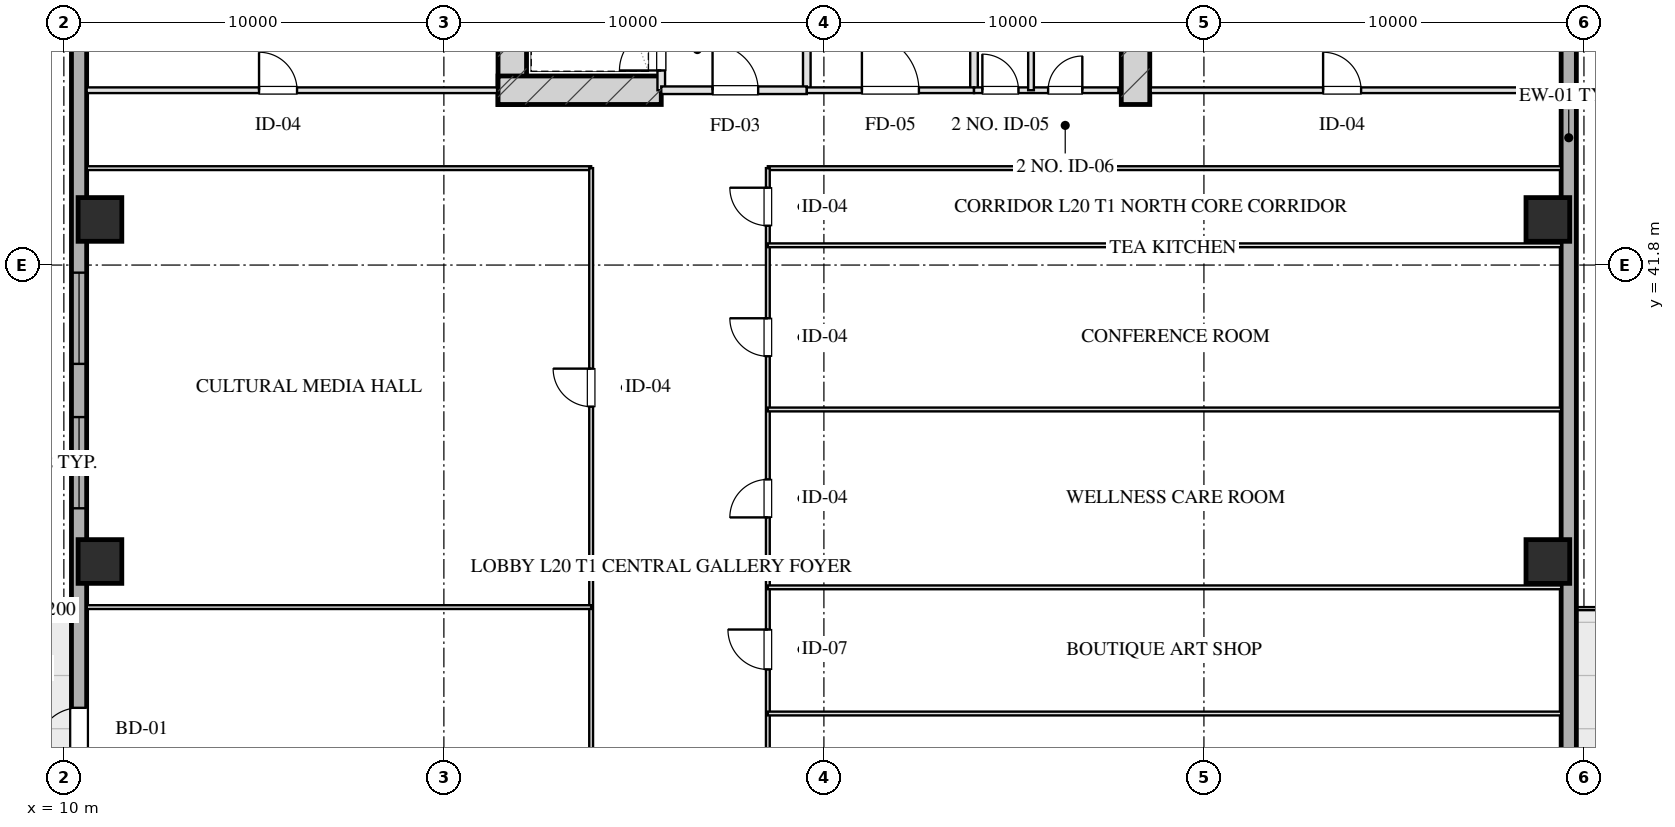
"""IFC4 building model, lengths in metres.
Left out: names, types, materials, properties, quantities, classifications, styles, units other than length and angle.
Written with IfcOpenShell. Run it as: python <this file> out.ifc"""

import sys

from ifc_helpers import new_model, si_unit, direction, frame, frame_2d, origin, origin_2d, place, context, subcontext, project, spatial, rectangle, hollow_rectangle, extrude, element, fill, save


model = new_model("IFC4")
c1 = context("Model", 3, precision=1e-05, world=origin(), true_north=direction((0.0, 1.0)))
c2 = subcontext(c1, "Body", "Model", "MODEL_VIEW")
j1 = project(units=[si_unit("LENGTHUNIT", "METRE"), si_unit("PLANEANGLEUNIT", "RADIAN")], contexts=[c1])
p1 = place(None, origin())
s1 = spatial("IfcSite", under=j1, at=p1, CompositionType="ELEMENT")
p2 = place(p1, origin())
s2 = spatial("IfcBuilding", under=s1, at=p2, CompositionType="ELEMENT")
p3 = place(p2, frame((0.0, 0.0, 81.65)))
s3 = spatial("IfcBuildingStorey", under=s2, at=p3, CompositionType="ELEMENT", Elevation=81.65)
for number, where, z_axis, x_axis in (
    (1, (21.8, 46.025, 0.0), (0.0, 0.0, 1.0), (0.0, 1.0, 0.0)),
    (2, (38.2, 46.025, 0.0), (0.0, 0.0, 1.0), (0.0, 1.0, 0.0)),
):
    element("IfcWall", number, at=place(p3, frame(where, z_axis=z_axis, x_axis=x_axis)), inside=s3, PredefinedType="SHEAR", context=c2, shape_type="SweptSolid", body=[
        extrude(rectangle(XDim=9.63, YDim=0.75, at=frame_2d((4.815, 0.0))), origin(), (0.0, 0.0, 1.0), 3.45),
    ])
p4 = place(p3, frame((21.425, 46.4, 0.0), z_axis=(0.0, 0.0, 1.0), x_axis=(1.0, 0.0, 0.0)))
e3 = element("IfcWall", 3, at=p4, inside=s3, PredefinedType="SHEAR", context=c2, shape_type="SweptSolid", body=[
    extrude(rectangle(XDim=4.295, YDim=0.75, at=frame_2d((2.147, 0.0))), origin(), (0.0, 0.0, 1.0), 3.45),
])
for number, where, z_axis, x_axis in (
    (4, (10.95, 34.0, 0.0), (0.0, 0.0, 1.0), (1.0, 0.0, 0.0)),
    (5, (10.95, 43.0, 0.0), (0.0, 0.0, 1.0), (1.0, 0.0, 0.0)),
    (6, (49.05, 34.0, 0.0), (0.0, 0.0, 1.0), (1.0, 0.0, 0.0)),
    (7, (49.05, 43.0, 0.0), (0.0, 0.0, 1.0), (1.0, 0.0, 0.0)),
):
    element("IfcColumn", number, at=place(p3, frame(where, z_axis=z_axis, x_axis=x_axis)), inside=s3, PredefinedType="COLUMN", context=c2, shape_type="SweptSolid", body=[
        extrude(hollow_rectangle(XDim=1.15, YDim=1.15, WallThickness=0.04, at=origin_2d()), origin(), (0.0, 0.0, 1.0), 3.451),
    ])
p5 = place(p3, frame((10.4, 7.2, 0.0), z_axis=(0.0, 0.0, 1.0), x_axis=(0.0, 1.0, 0.0)))
e8 = element("IfcWall", 8, at=p5, inside=s3, PredefinedType="SOLIDWALL", context=c2, shape_type="SweptSolid", body=[
    extrude(rectangle(XDim=53.6, YDim=0.4, at=frame_2d((26.8, 0.0))), origin(), (0.0, 0.0, 1.0), 2.61),
])
p6 = place(p5, frame((28.2, 0.0, 0.75)))
e9 = element("IfcOpeningElement", 9, at=p6, cuts=e8, PredefinedType="OPENING", context=c2, shape_type="SweptSolid", body=[
    extrude(rectangle(XDim=2.4, YDim=1.46, at=frame_2d((1.2, 0.73))), frame((0.0, 0.21, 0.0), z_axis=(0.0, -1.0, 0.0), x_axis=(1.0, 0.0, 0.0)), (0.0, 0.0, 1.0), 0.42),
])
p7 = place(p5, frame((32.0, 0.0, 0.75)))
e10 = element("IfcOpeningElement", 10, at=p7, cuts=e8, PredefinedType="OPENING", context=c2, shape_type="SweptSolid", body=[
    extrude(rectangle(XDim=2.4, YDim=1.46, at=frame_2d((1.2, 0.73))), frame((0.0, 0.21, 0.0), z_axis=(0.0, -1.0, 0.0), x_axis=(1.0, 0.0, 0.0)), (0.0, 0.0, 1.0), 0.42),
])
p8 = place(p5, frame((21.85, 0.0, 0.0)))
e11 = element("IfcOpeningElement", 11, at=p8, cuts=e8, PredefinedType="OPENING", context=c2, shape_type="SweptSolid", body=[
    extrude(rectangle(XDim=1.1, YDim=2.15, at=frame_2d((0.55, 1.075))), frame((0.0, 0.21, 0.0), z_axis=(0.0, -1.0, 0.0), x_axis=(1.0, 0.0, 0.0)), (0.0, 0.0, 1.0), 0.42),
])
p9 = place(p3, frame((49.6, 60.8, 0.0), z_axis=(0.0, 0.0, 1.0), x_axis=(0.0, -1.0, 0.0)))
e12 = element("IfcWall", 12, at=p9, inside=s3, PredefinedType="SOLIDWALL", context=c2, shape_type="SweptSolid", body=[
    extrude(rectangle(XDim=53.6, YDim=0.4, at=frame_2d((26.8, 0.0))), origin(), (0.0, 0.0, 1.0), 2.61),
])
p10 = place(p9, frame((32.05, 0.0, 0.0)))
e13 = element("IfcOpeningElement", 13, at=p10, cuts=e12, PredefinedType="OPENING", context=c2, shape_type="SweptSolid", body=[
    extrude(rectangle(XDim=1.1, YDim=2.15, at=frame_2d((0.55, 1.075))), frame((0.0, 0.21, 0.0), z_axis=(0.0, -1.0, 0.0), x_axis=(1.0, 0.0, 0.0)), (0.0, 0.0, 1.0), 0.42),
])
p11 = place(p3, frame((25.72, 46.4, 0.0), z_axis=(0.0, 0.0, 1.0), x_axis=(0.0, 1.0, 0.0)))
e14 = element("IfcWall", 14, at=p11, inside=s3, PredefinedType="PARTITIONING", context=c2, shape_type="SweptSolid", body=[
    extrude(rectangle(XDim=1.9, YDim=0.2, at=frame_2d((0.95, 0.0))), origin(), (0.0, 0.0, 1.0), 3.175),
])
p12 = place(p11, frame((0.52, 0.0, 0.0)))
e15 = element("IfcOpeningElement", 15, at=p12, cuts=e14, PredefinedType="OPENING", context=c2, shape_type="SweptSolid", body=[
    extrude(rectangle(XDim=1.1, YDim=2.05, at=frame_2d((0.55, 1.025))), frame((0.0, 0.11, 0.0), z_axis=(0.0, -1.0, 0.0), x_axis=(1.0, 0.0, 0.0)), (0.0, 0.0, 1.0), 0.22),
])
p13 = place(p3, frame((29.55, 46.4, 0.0), z_axis=(0.0, 0.0, 1.0), x_axis=(0.0, 1.0, 0.0)))
e16 = element("IfcWall", 16, at=p13, inside=s3, PredefinedType="PARTITIONING", context=c2, shape_type="SweptSolid", body=[
    extrude(rectangle(XDim=8.43, YDim=0.2, at=frame_2d((4.215, 0.0))), origin(), (0.0, 0.0, 1.0), 3.175),
])
p14 = place(p3, frame((25.72, 46.4, 0.0), z_axis=(0.0, 0.0, 1.0), x_axis=(1.0, 0.0, 0.0)))
e17 = element("IfcWall", 17, at=p14, inside=s3, PredefinedType="PARTITIONING", context=c2, shape_type="SweptSolid", body=[
    extrude(rectangle(XDim=3.83, YDim=0.2, at=frame_2d((1.915, 0.0))), origin(), (0.0, 0.0, 1.0), 3.175),
])
p15 = place(p14, frame((1.35, 0.0, 0.0)))
e18 = element("IfcOpeningElement", 18, at=p15, cuts=e17, PredefinedType="OPENING", context=c2, shape_type="SweptSolid", body=[
    extrude(rectangle(XDim=1.2, YDim=2.05, at=frame_2d((0.6, 1.025))), frame((0.0, 0.11, 0.0), z_axis=(0.0, -1.0, 0.0), x_axis=(1.0, 0.0, 0.0)), (0.0, 0.0, 1.0), 0.22),
])
p16 = place(p3, frame((33.95, 46.4, 0.0), z_axis=(0.0, 0.0, 1.0), x_axis=(0.0, 1.0, 0.0)))
e19 = element("IfcWall", 19, at=p16, inside=s3, PredefinedType="PARTITIONING", context=c2, shape_type="SweptSolid", body=[
    extrude(rectangle(XDim=8.43, YDim=0.2, at=frame_2d((4.215, 0.0))), origin(), (0.0, 0.0, 1.0), 3.175),
])
p17 = place(p3, frame((29.55, 46.4, 0.0), z_axis=(0.0, 0.0, 1.0), x_axis=(1.0, 0.0, 0.0)))
e20 = element("IfcWall", 20, at=p17, inside=s3, PredefinedType="PARTITIONING", context=c2, shape_type="SweptSolid", body=[
    extrude(rectangle(XDim=4.4, YDim=0.15, at=frame_2d((2.2, 0.0))), origin(), (0.0, 0.0, 1.0), 3.175),
])
p18 = place(p17, frame((1.45, 0.0, 0.0)))
e21 = element("IfcOpeningElement", 21, at=p18, cuts=e20, PredefinedType="OPENING", context=c2, shape_type="SweptSolid", body=[
    extrude(rectangle(XDim=1.5, YDim=2.05, at=frame_2d((0.75, 1.025))), frame((0.0, 0.085, 0.0), z_axis=(0.0, -1.0, 0.0), x_axis=(1.0, 0.0, 0.0)), (0.0, 0.0, 1.0), 0.17),
])
p19 = place(p3, frame((33.95, 46.4, 0.0), z_axis=(0.0, 0.0, 1.0), x_axis=(1.0, 0.0, 0.0)))
e22 = element("IfcWall", 22, at=p19, inside=s3, PredefinedType="PARTITIONING", context=c2, shape_type="SweptSolid", body=[
    extrude(rectangle(XDim=3.8, YDim=0.15, at=frame_2d((1.9, 0.0))), origin(), (0.0, 0.0, 1.0), 3.175),
])
p20 = place(p19, frame((0.22, 0.0, 0.0)))
e23 = element("IfcOpeningElement", 23, at=p20, cuts=e22, PredefinedType="OPENING", context=c2, shape_type="SweptSolid", body=[
    extrude(rectangle(XDim=0.95, YDim=2.05, at=frame_2d((0.475, 1.025))), frame((0.0, 0.085, 0.0), z_axis=(0.0, -1.0, 0.0), x_axis=(1.0, 0.0, 0.0)), (0.0, 0.0, 1.0), 0.17),
])
p21 = place(p19, frame((1.95, 0.0, 0.0)))
e24 = element("IfcOpeningElement", 24, at=p21, cuts=e22, PredefinedType="OPENING", context=c2, shape_type="SweptSolid", body=[
    extrude(rectangle(XDim=0.9, YDim=2.05, at=frame_2d((0.45, 1.025))), frame((0.0, 0.085, 0.0), z_axis=(0.0, -1.0, 0.0), x_axis=(1.0, 0.0, 0.0)), (0.0, 0.0, 1.0), 0.17),
])
p22 = place(p3, frame((35.45, 46.4, 0.0), z_axis=(0.0, 0.0, 1.0), x_axis=(0.0, 1.0, 0.0)))
e25 = element("IfcWall", 25, at=p22, inside=s3, PredefinedType="PARTITIONING", context=c2, shape_type="SweptSolid", body=[
    extrude(rectangle(XDim=8.43, YDim=0.15, at=frame_2d((4.215, 0.0))), origin(), (0.0, 0.0, 1.0), 2.765),
])
p23 = place(p22, frame((2.55, 0.0, 0.0)))
e26 = element("IfcOpeningElement", 26, at=p23, cuts=e25, PredefinedType="OPENING", context=c2, shape_type="SweptSolid", body=[
    extrude(rectangle(XDim=0.95, YDim=2.05, at=frame_2d((0.475, 1.025))), frame((0.0, 0.085, 0.0), z_axis=(0.0, -1.0, 0.0), x_axis=(1.0, 0.0, 0.0)), (0.0, 0.0, 1.0), 0.17),
])
p24 = place(p22, frame((5.6, 0.0, 0.0)))
e27 = element("IfcOpeningElement", 27, at=p24, cuts=e25, PredefinedType="OPENING", context=c2, shape_type="SweptSolid", body=[
    extrude(rectangle(XDim=0.9, YDim=2.05, at=frame_2d((0.45, 1.025))), frame((0.0, 0.085, 0.0), z_axis=(0.0, -1.0, 0.0), x_axis=(1.0, 0.0, 0.0)), (0.0, 0.0, 1.0), 0.17),
])
p25 = place(p3, frame((10.6, 46.4, 0.0), z_axis=(0.0, 0.0, 1.0), x_axis=(1.0, 0.0, 0.0)))
e28 = element("IfcWall", 28, at=p25, inside=s3, PredefinedType="PARTITIONING", context=c2, shape_type="SweptSolid", body=[
    extrude(rectangle(XDim=10.8, YDim=0.15, at=frame_2d((5.4, 0.0))), origin(), (0.0, 0.0, 1.0), 3.175),
])
p26 = place(p25, frame((4.536, 0.0, 0.0)))
e29 = element("IfcOpeningElement", 29, at=p26, cuts=e28, PredefinedType="OPENING", context=c2, shape_type="SweptSolid", body=[
    extrude(rectangle(XDim=1.0, YDim=2.05, at=frame_2d((0.5, 1.025))), frame((0.0, 0.085, 0.0), z_axis=(0.0, -1.0, 0.0), x_axis=(1.0, 0.0, 0.0)), (0.0, 0.0, 1.0), 0.17),
])
p27 = place(p3, frame((38.6, 46.4, 0.0), z_axis=(0.0, 0.0, 1.0), x_axis=(1.0, 0.0, 0.0)))
e30 = element("IfcWall", 30, at=p27, inside=s3, PredefinedType="PARTITIONING", context=c2, shape_type="SweptSolid", body=[
    extrude(rectangle(XDim=10.8, YDim=0.15, at=frame_2d((5.4, 0.0))), origin(), (0.0, 0.0, 1.0), 3.175),
])
p28 = place(p27, frame((4.536, 0.0, 0.0)))
e31 = element("IfcOpeningElement", 31, at=p28, cuts=e30, PredefinedType="OPENING", context=c2, shape_type="SweptSolid", body=[
    extrude(rectangle(XDim=1.0, YDim=2.05, at=frame_2d((0.5, 1.025))), frame((0.0, 0.085, 0.0), z_axis=(0.0, -1.0, 0.0), x_axis=(1.0, 0.0, 0.0)), (0.0, 0.0, 1.0), 0.17),
])
p29 = place(p3, frame((10.6, 44.35, 0.0), z_axis=(0.0, 0.0, 1.0), x_axis=(1.0, 0.0, 0.0)))
e32 = element("IfcWall", 32, at=p29, inside=s3, PredefinedType="MOVABLE", context=c2, shape_type="SweptSolid", body=[
    extrude(rectangle(XDim=13.275, YDim=0.1, at=frame_2d((6.637, 0.0))), origin(), (0.0, 0.0, 1.0), 3.175),
])
p30 = place(p3, frame((28.525, 44.35, 0.0), z_axis=(0.0, 0.0, 1.0), x_axis=(1.0, 0.0, 0.0)))
e33 = element("IfcWall", 33, at=p30, inside=s3, PredefinedType="MOVABLE", context=c2, shape_type="SweptSolid", body=[
    extrude(rectangle(XDim=20.875, YDim=0.1, at=frame_2d((10.438, 0.0))), origin(), (0.0, 0.0, 1.0), 3.175),
])
p31 = place(p3, frame((23.875, 23.65, 0.0), z_axis=(0.0, 0.0, 1.0), x_axis=(0.0, 1.0, 0.0)))
e34 = element("IfcWall", 34, at=p31, inside=s3, PredefinedType="MOVABLE", context=c2, shape_type="SweptSolid", body=[
    extrude(rectangle(XDim=20.7, YDim=0.1, at=frame_2d((10.35, 0.0))), origin(), (0.0, 0.0, 1.0), 3.175),
])
p32 = place(p31, frame((4.075, 0.0, 0.0)))
e35 = element("IfcOpeningElement", 35, at=p32, cuts=e34, PredefinedType="OPENING", context=c2, shape_type="SweptSolid", body=[
    extrude(rectangle(XDim=1.0, YDim=2.05, at=frame_2d((0.5, 1.025))), frame((0.0, 0.06, 0.0), z_axis=(0.0, -1.0, 0.0), x_axis=(1.0, 0.0, 0.0)), (0.0, 0.0, 1.0), 0.12),
])
p33 = place(p31, frame((14.425, 0.0, 0.0)))
e36 = element("IfcOpeningElement", 36, at=p33, cuts=e34, PredefinedType="OPENING", context=c2, shape_type="SweptSolid", body=[
    extrude(rectangle(XDim=1.0, YDim=2.05, at=frame_2d((0.5, 1.025))), frame((0.0, 0.06, 0.0), z_axis=(0.0, -1.0, 0.0), x_axis=(1.0, 0.0, 0.0)), (0.0, 0.0, 1.0), 0.12),
])
p34 = place(p3, frame((28.525, 23.65, 0.0), z_axis=(0.0, 0.0, 1.0), x_axis=(0.0, 1.0, 0.0)))
e37 = element("IfcWall", 37, at=p34, inside=s3, PredefinedType="MOVABLE", context=c2, shape_type="SweptSolid", body=[
    extrude(rectangle(XDim=20.7, YDim=0.1, at=frame_2d((10.35, 0.0))), origin(), (0.0, 0.0, 1.0), 3.175),
])
p35 = place(p34, frame((0.775, 0.0, 0.0)))
e38 = element("IfcOpeningElement", 38, at=p35, cuts=e37, PredefinedType="OPENING", context=c2, shape_type="SweptSolid", body=[
    extrude(rectangle(XDim=1.0, YDim=2.05, at=frame_2d((0.5, 1.025))), frame((0.0, 0.06, 0.0), z_axis=(0.0, -1.0, 0.0), x_axis=(1.0, 0.0, 0.0)), (0.0, 0.0, 1.0), 0.12),
])
p36 = place(p34, frame((3.95, 0.0, 0.0)))
e39 = element("IfcOpeningElement", 39, at=p36, cuts=e37, PredefinedType="OPENING", context=c2, shape_type="SweptSolid", body=[
    extrude(rectangle(XDim=1.0, YDim=2.05, at=frame_2d((0.5, 1.025))), frame((0.0, 0.06, 0.0), z_axis=(0.0, -1.0, 0.0), x_axis=(1.0, 0.0, 0.0)), (0.0, 0.0, 1.0), 0.12),
])
p37 = place(p34, frame((7.51, 0.0, 0.0)))
e40 = element("IfcOpeningElement", 40, at=p37, cuts=e37, PredefinedType="OPENING", context=c2, shape_type="SweptSolid", body=[
    extrude(rectangle(XDim=1.05, YDim=2.05, at=frame_2d((0.525, 1.025))), frame((0.0, 0.06, 0.0), z_axis=(0.0, -1.0, 0.0), x_axis=(1.0, 0.0, 0.0)), (0.0, 0.0, 1.0), 0.12),
])
p38 = place(p34, frame((11.51, 0.0, 0.0)))
e41 = element("IfcOpeningElement", 41, at=p38, cuts=e37, PredefinedType="OPENING", context=c2, shape_type="SweptSolid", body=[
    extrude(rectangle(XDim=1.0, YDim=2.05, at=frame_2d((0.5, 1.025))), frame((0.0, 0.06, 0.0), z_axis=(0.0, -1.0, 0.0), x_axis=(1.0, 0.0, 0.0)), (0.0, 0.0, 1.0), 0.12),
])
p39 = place(p34, frame((15.75, 0.0, 0.0)))
e42 = element("IfcOpeningElement", 42, at=p39, cuts=e37, PredefinedType="OPENING", context=c2, shape_type="SweptSolid", body=[
    extrude(rectangle(XDim=1.0, YDim=2.05, at=frame_2d((0.5, 1.025))), frame((0.0, 0.06, 0.0), z_axis=(0.0, -1.0, 0.0), x_axis=(1.0, 0.0, 0.0)), (0.0, 0.0, 1.0), 0.12),
])
p40 = place(p34, frame((19.185, 0.0, 0.0)))
e43 = element("IfcOpeningElement", 43, at=p40, cuts=e37, PredefinedType="OPENING", context=c2, shape_type="SweptSolid", body=[
    extrude(rectangle(XDim=1.0, YDim=2.05, at=frame_2d((0.5, 1.025))), frame((0.0, 0.06, 0.0), z_axis=(0.0, -1.0, 0.0), x_axis=(1.0, 0.0, 0.0)), (0.0, 0.0, 1.0), 0.12),
])
p41 = place(p3, frame((10.6, 32.8, 0.0), z_axis=(0.0, 0.0, 1.0), x_axis=(1.0, 0.0, 0.0)))
e44 = element("IfcWall", 44, at=p41, inside=s3, PredefinedType="MOVABLE", context=c2, shape_type="SweptSolid", body=[
    extrude(rectangle(XDim=13.275, YDim=0.1, at=frame_2d((6.637, 0.0))), origin(), (0.0, 0.0, 1.0), 3.175),
])
for number, where, z_axis, x_axis in (
    (45, (28.525, 30.0, 0.0), (0.0, 0.0, 1.0), (1.0, 0.0, 0.0)),
    (46, (28.525, 33.32, 0.0), (0.0, 0.0, 1.0), (1.0, 0.0, 0.0)),
    (47, (28.525, 38.0, 0.0), (0.0, 0.0, 1.0), (1.0, 0.0, 0.0)),
    (48, (28.525, 42.32, 0.0), (0.0, 0.0, 1.0), (1.0, 0.0, 0.0)),
):
    element("IfcWall", number, at=place(p3, frame(where, z_axis=z_axis, x_axis=x_axis)), inside=s3, PredefinedType="MOVABLE", context=c2, shape_type="SweptSolid", body=[
        extrude(rectangle(XDim=20.875, YDim=0.1, at=frame_2d((10.438, 0.0))), origin(), (0.0, 0.0, 1.0), 3.175),
    ])
p42 = place(p6, origin())
e49 = element("IfcWindow", 49, at=p42, inside=s3, PartitioningType="TRIPLE_PANEL_VERTICAL", PredefinedType="WINDOW", context=c2, shape_type="SweptSolid", body=[
    extrude(rectangle(XDim=2.4, YDim=1.46, at=frame_2d((1.2, 0.73))), frame((0.0, 0.03, 0.0), z_axis=(0.0, -1.0, 0.0), x_axis=(1.0, 0.0, 0.0)), (0.0, 0.0, 1.0), 0.06),
])
fill(e9, e49)
p43 = place(p7, origin())
e50 = element("IfcWindow", 50, at=p43, inside=s3, PartitioningType="TRIPLE_PANEL_VERTICAL", PredefinedType="WINDOW", context=c2, shape_type="SweptSolid", body=[
    extrude(rectangle(XDim=2.4, YDim=1.46, at=frame_2d((1.2, 0.73))), frame((0.0, 0.03, 0.0), z_axis=(0.0, -1.0, 0.0), x_axis=(1.0, 0.0, 0.0)), (0.0, 0.0, 1.0), 0.06),
])
fill(e10, e50)
p44 = place(p8, origin())
e51 = element("IfcDoor", 51, at=p44, inside=s3, OperationType="SINGLE_SWING_LEFT", PredefinedType="DOOR", context=c2, shape_type="SweptSolid", body=[
    extrude(rectangle(XDim=1.1, YDim=2.15, at=frame_2d((0.55, 1.075))), frame((0.0, 0.025, 0.0), z_axis=(0.0, -1.0, 0.0), x_axis=(1.0, 0.0, 0.0)), (0.0, 0.0, 1.0), 0.05),
])
fill(e11, e51)
p45 = place(p12, origin())
e52 = element("IfcDoor", 52, at=p45, inside=s3, OperationType="SINGLE_SWING_LEFT", PredefinedType="DOOR", context=c2, shape_type="SweptSolid", body=[
    extrude(rectangle(XDim=1.1, YDim=2.05, at=frame_2d((0.55, 1.025))), frame((0.0, 0.025, 0.0), z_axis=(0.0, -1.0, 0.0), x_axis=(1.0, 0.0, 0.0)), (0.0, 0.0, 1.0), 0.05),
])
fill(e15, e52)
p46 = place(p15, origin())
e53 = element("IfcDoor", 53, at=p46, inside=s3, OperationType="SINGLE_SWING_LEFT", PredefinedType="DOOR", context=c2, shape_type="SweptSolid", body=[
    extrude(rectangle(XDim=1.2, YDim=2.05, at=frame_2d((0.6, 1.025))), frame((0.0, 0.025, 0.0), z_axis=(0.0, -1.0, 0.0), x_axis=(1.0, 0.0, 0.0)), (0.0, 0.0, 1.0), 0.05),
])
fill(e18, e53)
p47 = place(p18, origin())
e54 = element("IfcDoor", 54, at=p47, inside=s3, OperationType="SINGLE_SWING_LEFT", PredefinedType="DOOR", context=c2, shape_type="SweptSolid", body=[
    extrude(rectangle(XDim=1.5, YDim=2.05, at=frame_2d((0.75, 1.025))), frame((0.0, 0.025, 0.0), z_axis=(0.0, -1.0, 0.0), x_axis=(1.0, 0.0, 0.0)), (0.0, 0.0, 1.0), 0.05),
])
fill(e21, e54)
p48 = place(p20, origin())
e55 = element("IfcDoor", 55, at=p48, inside=s3, OperationType="SINGLE_SWING_LEFT", PredefinedType="DOOR", context=c2, shape_type="SweptSolid", body=[
    extrude(rectangle(XDim=0.95, YDim=2.05, at=frame_2d((0.475, 1.025))), frame((0.0, 0.025, 0.0), z_axis=(0.0, -1.0, 0.0), x_axis=(1.0, 0.0, 0.0)), (0.0, 0.0, 1.0), 0.05),
])
fill(e23, e55)
p49 = place(p21, origin())
e56 = element("IfcDoor", 56, at=p49, inside=s3, OperationType="SINGLE_SWING_RIGHT", PredefinedType="DOOR", context=c2, shape_type="SweptSolid", body=[
    extrude(rectangle(XDim=0.9, YDim=2.05, at=frame_2d((0.45, 1.025))), frame((0.0, 0.025, 0.0), z_axis=(0.0, -1.0, 0.0), x_axis=(1.0, 0.0, 0.0)), (0.0, 0.0, 1.0), 0.05),
])
fill(e24, e56)
p50 = place(p26, origin())
e57 = element("IfcDoor", 57, at=p50, inside=s3, OperationType="SINGLE_SWING_LEFT", PredefinedType="DOOR", context=c2, shape_type="SweptSolid", body=[
    extrude(rectangle(XDim=1.0, YDim=2.05, at=frame_2d((0.5, 1.025))), frame((0.0, 0.025, 0.0), z_axis=(0.0, -1.0, 0.0), x_axis=(1.0, 0.0, 0.0)), (0.0, 0.0, 1.0), 0.05),
])
fill(e29, e57)
p51 = place(p28, origin())
e58 = element("IfcDoor", 58, at=p51, inside=s3, OperationType="SINGLE_SWING_LEFT", PredefinedType="DOOR", context=c2, shape_type="SweptSolid", body=[
    extrude(rectangle(XDim=1.0, YDim=2.05, at=frame_2d((0.5, 1.025))), frame((0.0, 0.025, 0.0), z_axis=(0.0, -1.0, 0.0), x_axis=(1.0, 0.0, 0.0)), (0.0, 0.0, 1.0), 0.05),
])
fill(e31, e58)
p52 = place(p33, origin())
e59 = element("IfcDoor", 59, at=p52, inside=s3, OperationType="SINGLE_SWING_RIGHT", PredefinedType="DOOR", context=c2, shape_type="SweptSolid", body=[
    extrude(rectangle(XDim=1.0, YDim=2.05, at=frame_2d((0.5, 1.025))), frame((0.0, 0.025, 0.0), z_axis=(0.0, -1.0, 0.0), x_axis=(1.0, 0.0, 0.0)), (0.0, 0.0, 1.0), 0.05),
])
fill(e36, e59)
p53 = place(p37, origin())
e60 = element("IfcDoor", 60, at=p53, inside=s3, OperationType="SINGLE_SWING_RIGHT", PredefinedType="DOOR", context=c2, shape_type="SweptSolid", body=[
    extrude(rectangle(XDim=1.05, YDim=2.05, at=frame_2d((0.525, 1.025))), frame((0.0, 0.025, 0.0), z_axis=(0.0, -1.0, 0.0), x_axis=(1.0, 0.0, 0.0)), (0.0, 0.0, 1.0), 0.05),
])
fill(e40, e60)
p54 = place(p38, origin())
e61 = element("IfcDoor", 61, at=p54, inside=s3, OperationType="SINGLE_SWING_LEFT", PredefinedType="DOOR", context=c2, shape_type="SweptSolid", body=[
    extrude(rectangle(XDim=1.0, YDim=2.05, at=frame_2d((0.5, 1.025))), frame((0.0, 0.025, 0.0), z_axis=(0.0, -1.0, 0.0), x_axis=(1.0, 0.0, 0.0)), (0.0, 0.0, 1.0), 0.05),
])
fill(e41, e61)
p55 = place(p39, origin())
e62 = element("IfcDoor", 62, at=p55, inside=s3, OperationType="SINGLE_SWING_RIGHT", PredefinedType="DOOR", context=c2, shape_type="SweptSolid", body=[
    extrude(rectangle(XDim=1.0, YDim=2.05, at=frame_2d((0.5, 1.025))), frame((0.0, 0.025, 0.0), z_axis=(0.0, -1.0, 0.0), x_axis=(1.0, 0.0, 0.0)), (0.0, 0.0, 1.0), 0.05),
])
fill(e42, e62)
p56 = place(p40, origin())
e63 = element("IfcDoor", 63, at=p56, inside=s3, OperationType="SINGLE_SWING_RIGHT", PredefinedType="DOOR", context=c2, shape_type="SweptSolid", body=[
    extrude(rectangle(XDim=1.0, YDim=2.05, at=frame_2d((0.5, 1.025))), frame((0.0, 0.025, 0.0), z_axis=(0.0, -1.0, 0.0), x_axis=(1.0, 0.0, 0.0)), (0.0, 0.0, 1.0), 0.05),
])
fill(e43, e63)
save(model, sys.argv[1])
